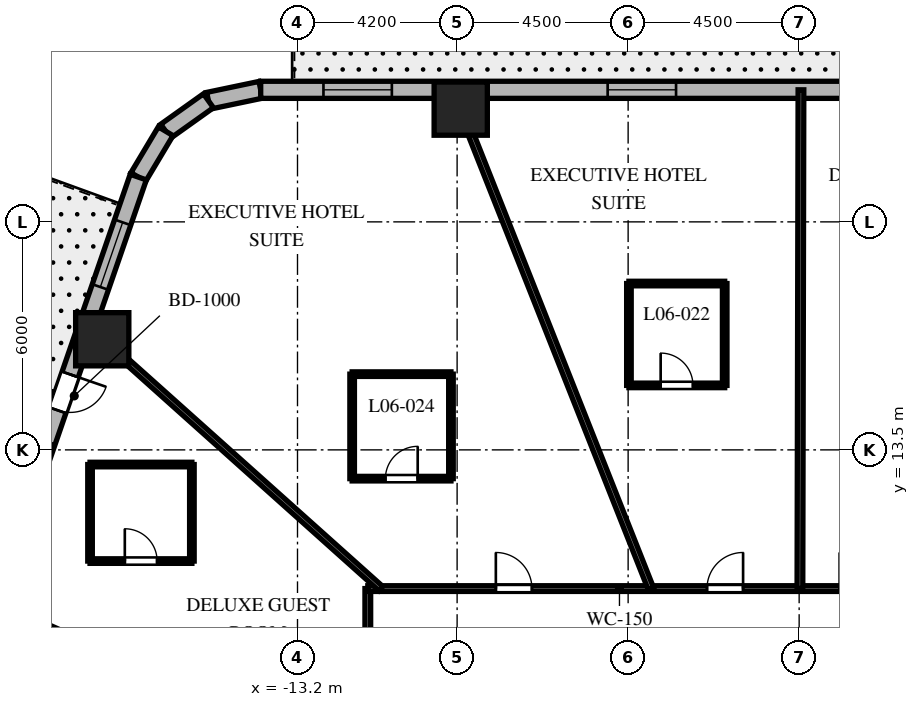
"""IFC4 building model, lengths in metres.
Left out: names, types, materials, properties, quantities, classifications, styles, units other than length and angle.
Written with IfcOpenShell. Run it as: python <this file> out.ifc"""

import sys

from ifc_helpers import new_model, si_unit, direction, frame, frame_2d, origin, origin_2d, place, context, subcontext, project, spatial, rectangle, extrude, element, fill, save


model = new_model("IFC4")
c1 = context("Model", 3, precision=1e-05, world=origin(), true_north=direction((0.0, 1.0)))
c2 = subcontext(c1, "Body", "Model", "MODEL_VIEW")
j1 = project(units=[si_unit("LENGTHUNIT", "METRE"), si_unit("PLANEANGLEUNIT", "RADIAN")], contexts=[c1])
p1 = place(None, origin())
s1 = spatial("IfcSite", under=j1, at=p1, CompositionType="ELEMENT")
p2 = place(p1, origin())
s2 = spatial("IfcBuilding", under=s1, at=p2, CompositionType="ELEMENT")
p3 = place(p2, frame((0.0, 0.0, 34.2)))
s3 = spatial("IfcBuildingStorey", under=s2, at=p3, CompositionType="ELEMENT", Elevation=34.2)
for number, where, z_axis, x_axis in (
    (1, (-8.905, 22.48, 0.0), (0.0, 0.0, 1.0), (1.0, 0.0, 0.0)),
    (2, (-18.338, 16.411, 0.0), (0.0, 0.0, 1.0), (1.0, 0.0, 0.0)),
):
    element("IfcColumn", number, at=place(p3, frame(where, z_axis=z_axis, x_axis=x_axis)), inside=s3, PredefinedType="COLUMN", context=c2, shape_type="SweptSolid", body=[
        extrude(rectangle(XDim=1.4, YDim=1.4, at=origin_2d()), origin(), (0.0, 0.0, 1.0), 3.7),
    ])
p4 = place(p3, frame((-14.168, 22.975, 0.0), z_axis=(0.0, 0.0, 1.0), x_axis=(-0.978770371074, -0.204959900243, 0.0)))
e3 = element("IfcWall", 3, at=p4, inside=s3, PredefinedType="SOLIDWALL", context=c2, shape_type="SweptSolid", body=[
    extrude(rectangle(XDim=1.406, YDim=0.45, at=frame_2d((0.703, 0.0))), origin(), (0.0, 0.0, 1.0), 3.4),
])
p5 = place(p3, frame((-15.544, 22.687, 0.0), z_axis=(0.0, 0.0, 1.0), x_axis=(-0.814210854316, -0.580569276412, 0.0)))
e4 = element("IfcWall", 4, at=p5, inside=s3, PredefinedType="SOLIDWALL", context=c2, shape_type="SweptSolid", body=[
    extrude(rectangle(XDim=1.381, YDim=0.45, at=frame_2d((0.691, 0.0))), origin(), (0.0, 0.0, 1.0), 3.4),
])
p6 = place(p3, frame((-16.669, 21.885, 0.0), z_axis=(0.0, 0.0, 1.0), x_axis=(-0.512936712947, -0.858426425799, 0.0)))
e5 = element("IfcWall", 5, at=p6, inside=s3, PredefinedType="SOLIDWALL", context=c2, shape_type="SweptSolid", body=[
    extrude(rectangle(XDim=1.406, YDim=0.45, at=frame_2d((0.703, 0.0))), origin(), (0.0, 0.0, 1.0), 3.4),
])
p7 = place(p3, frame((12.221, 22.975, 0.0), z_axis=(0.0, 0.0, 1.0), x_axis=(-1.0, 0.0, 0.0)))
e6 = element("IfcWall", 6, at=p7, inside=s3, PredefinedType="SOLIDWALL", context=c2, shape_type="SweptSolid", body=[
    extrude(rectangle(XDim=26.389, YDim=0.45, at=frame_2d((13.195, 0.0))), origin(), (0.0, 0.0, 1.0), 3.4),
])
p8 = place(p7, frame((2.799, 0.0, 0.0)))
e7 = element("IfcOpeningElement", 7, at=p8, cuts=e6, PredefinedType="OPENING", context=c2, shape_type="SweptSolid", body=[
    extrude(rectangle(XDim=0.95, YDim=2.15, at=frame_2d((0.475, 1.075))), frame((0.0, 0.235, 0.0), z_axis=(0.0, -1.0, 0.0), x_axis=(1.0, 0.0, 0.0)), (0.0, 0.0, 1.0), 0.47),
])
p9 = place(p7, frame((8.11, 0.0, 0.8)))
e8 = element("IfcOpeningElement", 8, at=p9, cuts=e6, PredefinedType="OPENING", context=c2, shape_type="SweptSolid", body=[
    extrude(rectangle(XDim=1.8, YDim=1.8, at=frame_2d((0.9, 0.9))), frame((0.0, 0.235, 0.0), z_axis=(0.0, -1.0, 0.0), x_axis=(1.0, 0.0, 0.0)), (0.0, 0.0, 1.0), 0.47),
])
p10 = place(p7, frame((15.46, 0.0, 0.8)))
e9 = element("IfcOpeningElement", 9, at=p10, cuts=e6, PredefinedType="OPENING", context=c2, shape_type="SweptSolid", body=[
    extrude(rectangle(XDim=1.8, YDim=1.8, at=frame_2d((0.9, 0.9))), frame((0.0, 0.235, 0.0), z_axis=(0.0, -1.0, 0.0), x_axis=(1.0, 0.0, 0.0)), (0.0, 0.0, 1.0), 0.47),
])
p11 = place(p7, frame((22.938, 0.0, 0.8)))
e10 = element("IfcOpeningElement", 10, at=p11, cuts=e6, PredefinedType="OPENING", context=c2, shape_type="SweptSolid", body=[
    extrude(rectangle(XDim=1.8, YDim=1.8, at=frame_2d((0.9, 0.9))), frame((0.0, 0.235, 0.0), z_axis=(0.0, -1.0, 0.0), x_axis=(1.0, 0.0, 0.0)), (0.0, 0.0, 1.0), 0.47),
])
p12 = place(p3, frame((-17.39, 20.678, 0.0), z_axis=(0.0, 0.0, 1.0), x_axis=(-0.326068018294, -0.945346310854, 0.0)))
e11 = element("IfcWall", 11, at=p12, inside=s3, PredefinedType="SOLIDWALL", context=c2, shape_type="SweptSolid", body=[
    extrude(rectangle(XDim=21.793, YDim=0.45, at=frame_2d((10.896, 0.0))), origin(), (0.0, 0.0, 1.0), 3.4),
])
p13 = place(p12, frame((5.493, 0.0, 0.0)))
e12 = element("IfcOpeningElement", 12, at=p13, cuts=e11, PredefinedType="OPENING", context=c2, shape_type="SweptSolid", body=[
    extrude(rectangle(XDim=1.0, YDim=2.15, at=frame_2d((0.5, 1.075))), frame((0.0, 0.235, 0.0), z_axis=(0.0, -1.0, 0.0), x_axis=(1.0, 0.0, 0.0)), (0.0, 0.0, 1.0), 0.47),
])
p14 = place(p12, frame((1.26, 0.0, 0.8)))
e13 = element("IfcOpeningElement", 13, at=p14, cuts=e11, PredefinedType="OPENING", context=c2, shape_type="SweptSolid", body=[
    extrude(rectangle(XDim=1.8, YDim=1.8, at=frame_2d((0.9, 0.9))), frame((0.0, 0.235, 0.0), z_axis=(0.0, -1.0, 0.0), x_axis=(1.0, 0.0, 0.0)), (0.0, 0.0, 1.0), 0.47),
])
p15 = place(p12, frame((7.363, 0.0, 0.8)))
e14 = element("IfcOpeningElement", 14, at=p15, cuts=e11, PredefinedType="OPENING", context=c2, shape_type="SweptSolid", body=[
    extrude(rectangle(XDim=1.8, YDim=1.8, at=frame_2d((0.9, 0.9))), frame((0.0, 0.235, 0.0), z_axis=(0.0, -1.0, 0.0), x_axis=(1.0, 0.0, 0.0)), (0.0, 0.0, 1.0), 0.47),
])
p16 = place(p12, frame((13.518, 0.0, 0.8)))
e15 = element("IfcOpeningElement", 15, at=p16, cuts=e11, PredefinedType="OPENING", context=c2, shape_type="SweptSolid", body=[
    extrude(rectangle(XDim=1.8, YDim=1.8, at=frame_2d((0.9, 0.9))), frame((0.0, 0.235, 0.0), z_axis=(0.0, -1.0, 0.0), x_axis=(1.0, 0.0, 0.0)), (0.0, 0.0, 1.0), 0.47),
])
p17 = place(p12, frame((18.68, 0.0, 0.8)))
e16 = element("IfcOpeningElement", 16, at=p17, cuts=e11, PredefinedType="OPENING", context=c2, shape_type="SweptSolid", body=[
    extrude(rectangle(XDim=1.8, YDim=1.8, at=frame_2d((0.9, 0.9))), frame((0.0, 0.235, 0.0), z_axis=(0.0, -1.0, 0.0), x_axis=(1.0, 0.0, 0.0)), (0.0, 0.0, 1.0), 0.47),
])
p18 = place(p3, frame((-11.35, -9.85, 0.0), z_axis=(0.0, 0.0, 1.0), x_axis=(0.0, 1.0, 0.0)))
e17 = element("IfcWall", 17, at=p18, inside=s3, PredefinedType="PARTITIONING", context=c2, shape_type="SweptSolid", body=[
    extrude(rectangle(XDim=19.7, YDim=0.15, at=frame_2d((9.85, 0.0))), origin(), (0.0, 0.0, 1.0), 2.84),
])
p19 = place(p18, frame((16.714, 0.0, 0.0)))
e18 = element("IfcOpeningElement", 18, at=p19, cuts=e17, PredefinedType="OPENING", context=c2, shape_type="SweptSolid", body=[
    extrude(rectangle(XDim=0.95, YDim=2.03, at=frame_2d((0.475, 1.015))), frame((0.0, 0.085, 0.0), z_axis=(0.0, -1.0, 0.0), x_axis=(1.0, 0.0, 0.0)), (0.0, 0.0, 1.0), 0.17),
])
p20 = place(p18, frame((12.932, 0.0, 0.0)))
e19 = element("IfcOpeningElement", 19, at=p20, cuts=e17, PredefinedType="OPENING", context=c2, shape_type="SweptSolid", body=[
    extrude(rectangle(XDim=0.95, YDim=2.03, at=frame_2d((0.475, 1.015))), frame((0.0, 0.085, 0.0), z_axis=(0.0, -1.0, 0.0), x_axis=(1.0, 0.0, 0.0)), (0.0, 0.0, 1.0), 0.17),
])
p21 = place(p18, frame((8.838, 0.0, 0.0)))
e20 = element("IfcOpeningElement", 20, at=p21, cuts=e17, PredefinedType="OPENING", context=c2, shape_type="SweptSolid", body=[
    extrude(rectangle(XDim=0.95, YDim=2.03, at=frame_2d((0.475, 1.015))), frame((0.0, 0.085, 0.0), z_axis=(0.0, -1.0, 0.0), x_axis=(1.0, 0.0, 0.0)), (0.0, 0.0, 1.0), 0.17),
])
p22 = place(p18, frame((4.461, 0.0, 0.0)))
e21 = element("IfcOpeningElement", 21, at=p22, cuts=e17, PredefinedType="OPENING", context=c2, shape_type="SweptSolid", body=[
    extrude(rectangle(XDim=0.95, YDim=2.03, at=frame_2d((0.475, 1.015))), frame((0.0, 0.085, 0.0), z_axis=(0.0, -1.0, 0.0), x_axis=(1.0, 0.0, 0.0)), (0.0, 0.0, 1.0), 0.17),
])
p23 = place(p18, frame((1.221, 0.0, 0.0)))
e22 = element("IfcOpeningElement", 22, at=p23, cuts=e17, PredefinedType="OPENING", context=c2, shape_type="SweptSolid", body=[
    extrude(rectangle(XDim=0.95, YDim=2.03, at=frame_2d((0.475, 1.015))), frame((0.0, 0.085, 0.0), z_axis=(0.0, -1.0, 0.0), x_axis=(1.0, 0.0, 0.0)), (0.0, 0.0, 1.0), 0.17),
])
p24 = place(p3, frame((-11.35, 9.85, 0.0), z_axis=(0.0, 0.0, 1.0), x_axis=(1.0, 0.0, 0.0)))
e23 = element("IfcWall", 23, at=p24, inside=s3, PredefinedType="PARTITIONING", context=c2, shape_type="SweptSolid", body=[
    extrude(rectangle(XDim=22.7, YDim=0.15, at=frame_2d((11.35, 0.0))), origin(), (0.0, 0.0, 1.0), 2.84),
])
p25 = place(p24, frame((18.436, 0.0, 0.0)))
e24 = element("IfcOpeningElement", 24, at=p25, cuts=e23, PredefinedType="OPENING", context=c2, shape_type="SweptSolid", body=[
    extrude(rectangle(XDim=0.95, YDim=2.03, at=frame_2d((0.475, 1.015))), frame((0.0, 0.085, 0.0), z_axis=(0.0, -1.0, 0.0), x_axis=(1.0, 0.0, 0.0)), (0.0, 0.0, 1.0), 0.17),
])
p26 = place(p24, frame((15.176, 0.0, 0.0)))
e25 = element("IfcOpeningElement", 25, at=p26, cuts=e23, PredefinedType="OPENING", context=c2, shape_type="SweptSolid", body=[
    extrude(rectangle(XDim=0.9, YDim=2.03, at=frame_2d((0.45, 1.015))), frame((0.0, 0.085, 0.0), z_axis=(0.0, -1.0, 0.0), x_axis=(1.0, 0.0, 0.0)), (0.0, 0.0, 1.0), 0.17),
])
p27 = place(p24, frame((12.415, 0.0, 0.0)))
e26 = element("IfcOpeningElement", 26, at=p27, cuts=e23, PredefinedType="OPENING", context=c2, shape_type="SweptSolid", body=[
    extrude(rectangle(XDim=0.95, YDim=2.03, at=frame_2d((0.475, 1.015))), frame((0.0, 0.085, 0.0), z_axis=(0.0, -1.0, 0.0), x_axis=(1.0, 0.0, 0.0)), (0.0, 0.0, 1.0), 0.17),
])
p28 = place(p24, frame((8.925, 0.0, 0.0)))
e27 = element("IfcOpeningElement", 27, at=p28, cuts=e23, PredefinedType="OPENING", context=c2, shape_type="SweptSolid", body=[
    extrude(rectangle(XDim=0.95, YDim=2.03, at=frame_2d((0.475, 1.015))), frame((0.0, 0.085, 0.0), z_axis=(0.0, -1.0, 0.0), x_axis=(1.0, 0.0, 0.0)), (0.0, 0.0, 1.0), 0.17),
])
p29 = place(p24, frame((3.369, 0.0, 0.0)))
e28 = element("IfcOpeningElement", 28, at=p29, cuts=e23, PredefinedType="OPENING", context=c2, shape_type="SweptSolid", body=[
    extrude(rectangle(XDim=0.95, YDim=2.03, at=frame_2d((0.475, 1.015))), frame((0.0, 0.085, 0.0), z_axis=(0.0, -1.0, 0.0), x_axis=(1.0, 0.0, 0.0)), (0.0, 0.0, 1.0), 0.17),
])
p30 = place(p3, frame((0.021, 9.85, 0.0), z_axis=(0.0, 0.0, 1.0), x_axis=(0.002064727742, 0.999997868447, 0.0)))
e29 = element("IfcWall", 29, at=p30, inside=s3, PredefinedType="PARTITIONING", context=c2, shape_type="SweptSolid", body=[
    extrude(rectangle(XDim=13.125, YDim=0.15, at=frame_2d((6.562, 0.0))), origin(), (0.0, 0.0, 1.0), 2.54),
])
p31 = place(p3, frame((-3.902, 9.85, 0.0), z_axis=(0.0, 0.0, 1.0), x_axis=(-0.36828765711, 0.929711891728, 0.0)))
e30 = element("IfcWall", 30, at=p31, inside=s3, PredefinedType="PARTITIONING", context=c2, shape_type="SweptSolid", body=[
    extrude(rectangle(XDim=14.117, YDim=0.15, at=frame_2d((7.059, 0.0))), origin(), (0.0, 0.0, 1.0), 2.54),
])
p32 = place(p3, frame((-11.007, 9.85, 0.0), z_axis=(0.0, 0.0, 1.0), x_axis=(-0.745177305978, 0.666866390407, 0.0)))
e31 = element("IfcWall", 31, at=p32, inside=s3, PredefinedType="PARTITIONING", context=c2, shape_type="SweptSolid", body=[
    extrude(rectangle(XDim=10.375, YDim=0.15, at=frame_2d((5.188, 0.0))), origin(), (0.0, 0.0, 1.0), 2.54),
])
p33 = place(p3, frame((-11.35, 5.068, 0.0), z_axis=(0.0, 0.0, 1.0), x_axis=(-0.913107192911, 0.407719577963, 0.0)))
e32 = element("IfcWall", 32, at=p33, inside=s3, PredefinedType="PARTITIONING", context=c2, shape_type="SweptSolid", body=[
    extrude(rectangle(XDim=10.841, YDim=0.15, at=frame_2d((5.421, 0.0))), origin(), (0.0, 0.0, 1.0), 2.54),
])
p34 = place(p3, frame((-4.479, 15.197, 0.0), z_axis=(0.0, 0.0, 1.0), x_axis=(1.0, 0.0, 0.0)))
e33 = element("IfcWall", 33, at=p34, inside=s3, PredefinedType="PARTITIONING", context=c2, shape_type="SweptSolid", body=[
    extrude(rectangle(XDim=2.52, YDim=0.12, at=frame_2d((1.26, 0.0))), origin(), (0.0, 0.0, 1.0), 3.4),
])
p35 = place(p34, frame((0.835, 0.0, 0.0)))
e34 = element("IfcOpeningElement", 34, at=p35, cuts=e33, PredefinedType="OPENING", context=c2, shape_type="SweptSolid", body=[
    extrude(rectangle(XDim=0.85, YDim=2.03, at=frame_2d((0.425, 1.015))), frame((0.0, 0.07, 0.0), z_axis=(0.0, -1.0, 0.0), x_axis=(1.0, 0.0, 0.0)), (0.0, 0.0, 1.0), 0.14),
])
p36 = place(p3, frame((-1.959, 15.197, 0.0), z_axis=(0.0, 0.0, 1.0), x_axis=(0.0, 1.0, 0.0)))
e35 = element("IfcWall", 35, at=p36, inside=s3, PredefinedType="PARTITIONING", context=c2, shape_type="SweptSolid", body=[
    extrude(rectangle(XDim=2.68, YDim=0.12, at=frame_2d((1.34, 0.0))), origin(), (0.0, 0.0, 1.0), 2.841),
])
p37 = place(p3, frame((-1.959, 17.877, 0.0), z_axis=(0.0, 0.0, 1.0), x_axis=(-1.0, 0.0, 0.0)))
e36 = element("IfcWall", 36, at=p37, inside=s3, PredefinedType="PARTITIONING", context=c2, shape_type="SweptSolid", body=[
    extrude(rectangle(XDim=2.52, YDim=0.12, at=frame_2d((1.26, 0.0))), origin(), (0.0, 0.0, 1.0), 2.841),
])
p38 = place(p3, frame((-4.479, 17.877, 0.0), z_axis=(0.0, 0.0, 1.0), x_axis=(0.0, -1.0, 0.0)))
e37 = element("IfcWall", 37, at=p38, inside=s3, PredefinedType="PARTITIONING", context=c2, shape_type="SweptSolid", body=[
    extrude(rectangle(XDim=2.68, YDim=0.12, at=frame_2d((1.34, 0.0))), origin(), (0.0, 0.0, 1.0), 2.841),
])
p39 = place(p3, frame((-11.762, 12.743, 0.0), z_axis=(0.0, 0.0, 1.0), x_axis=(1.0, 0.0, 0.0)))
e38 = element("IfcWall", 38, at=p39, inside=s3, PredefinedType="PARTITIONING", context=c2, shape_type="SweptSolid", body=[
    extrude(rectangle(XDim=2.6, YDim=0.12, at=frame_2d((1.3, 0.0))), origin(), (0.0, 0.0, 1.0), 2.972),
])
p40 = place(p39, frame((0.875, 0.0, 0.0)))
e39 = element("IfcOpeningElement", 39, at=p40, cuts=e38, PredefinedType="OPENING", context=c2, shape_type="SweptSolid", body=[
    extrude(rectangle(XDim=0.85, YDim=2.03, at=frame_2d((0.425, 1.015))), frame((0.0, 0.07, 0.0), z_axis=(0.0, -1.0, 0.0), x_axis=(1.0, 0.0, 0.0)), (0.0, 0.0, 1.0), 0.14),
])
p41 = place(p3, frame((-9.162, 12.743, 0.0), z_axis=(0.0, 0.0, 1.0), x_axis=(0.0, 1.0, 0.0)))
e40 = element("IfcWall", 40, at=p41, inside=s3, PredefinedType="PARTITIONING", context=c2, shape_type="SweptSolid", body=[
    extrude(rectangle(XDim=2.75, YDim=0.12, at=frame_2d((1.375, 0.0))), origin(), (0.0, 0.0, 1.0), 2.84),
])
p42 = place(p3, frame((-9.162, 15.493, 0.0), z_axis=(0.0, 0.0, 1.0), x_axis=(-1.0, 0.0, 0.0)))
e41 = element("IfcWall", 41, at=p42, inside=s3, PredefinedType="PARTITIONING", context=c2, shape_type="SweptSolid", body=[
    extrude(rectangle(XDim=2.6, YDim=0.12, at=frame_2d((1.3, 0.0))), origin(), (0.0, 0.0, 1.0), 3.4),
])
p43 = place(p3, frame((-11.762, 15.493, 0.0), z_axis=(0.0, 0.0, 1.0), x_axis=(0.0, -1.0, 0.0)))
e42 = element("IfcWall", 42, at=p43, inside=s3, PredefinedType="PARTITIONING", context=c2, shape_type="SweptSolid", body=[
    extrude(rectangle(XDim=2.75, YDim=0.12, at=frame_2d((1.375, 0.0))), origin(), (0.0, 0.0, 1.0), 3.4),
])
p44 = place(p3, frame((-18.659, 10.574, 0.0), z_axis=(0.0, 0.0, 1.0), x_axis=(1.0, 0.0, 0.0)))
e43 = element("IfcWall", 43, at=p44, inside=s3, PredefinedType="PARTITIONING", context=c2, shape_type="SweptSolid", body=[
    extrude(rectangle(XDim=2.68, YDim=0.12, at=frame_2d((1.34, 0.0))), origin(), (0.0, 0.0, 1.0), 2.972),
])
p45 = place(p44, frame((0.915, 0.0, 0.0)))
e44 = element("IfcOpeningElement", 44, at=p45, cuts=e43, PredefinedType="OPENING", context=c2, shape_type="SweptSolid", body=[
    extrude(rectangle(XDim=0.85, YDim=2.03, at=frame_2d((0.425, 1.015))), frame((0.0, 0.07, 0.0), z_axis=(0.0, -1.0, 0.0), x_axis=(1.0, 0.0, 0.0)), (0.0, 0.0, 1.0), 0.14),
])
p46 = place(p3, frame((-15.979, 10.574, 0.0), z_axis=(0.0, 0.0, 1.0), x_axis=(0.0, 1.0, 0.0)))
e45 = element("IfcWall", 45, at=p46, inside=s3, PredefinedType="PARTITIONING", context=c2, shape_type="SweptSolid", body=[
    extrude(rectangle(XDim=2.54, YDim=0.12, at=frame_2d((1.27, 0.0))), origin(), (0.0, 0.0, 1.0), 2.972),
])
p47 = place(p3, frame((-15.979, 13.114, 0.0), z_axis=(0.0, 0.0, 1.0), x_axis=(-1.0, 0.0, 0.0)))
e46 = element("IfcWall", 46, at=p47, inside=s3, PredefinedType="PARTITIONING", context=c2, shape_type="SweptSolid", body=[
    extrude(rectangle(XDim=2.68, YDim=0.12, at=frame_2d((1.34, 0.0))), origin(), (0.0, 0.0, 1.0), 3.4),
])
p48 = place(p3, frame((-18.659, 13.114, 0.0), z_axis=(0.0, 0.0, 1.0), x_axis=(0.0, -1.0, 0.0)))
e47 = element("IfcWall", 47, at=p48, inside=s3, PredefinedType="PARTITIONING", context=c2, shape_type="SweptSolid", body=[
    extrude(rectangle(XDim=2.54, YDim=0.12, at=frame_2d((1.27, 0.0))), origin(), (0.0, 0.0, 1.0), 3.4),
])
p49 = place(p10, origin())
e48 = element("IfcWindow", 48, at=p49, inside=s3, PartitioningType="SINGLE_PANEL", PredefinedType="WINDOW", context=c2, shape_type="SweptSolid", body=[
    extrude(rectangle(XDim=1.8, YDim=1.8, at=frame_2d((0.9, 0.9))), frame((0.0, 0.03, 0.0), z_axis=(0.0, -1.0, 0.0), x_axis=(1.0, 0.0, 0.0)), (0.0, 0.0, 1.0), 0.06),
])
fill(e9, e48)
p50 = place(p11, origin())
e49 = element("IfcWindow", 49, at=p50, inside=s3, PartitioningType="SINGLE_PANEL", PredefinedType="WINDOW", context=c2, shape_type="SweptSolid", body=[
    extrude(rectangle(XDim=1.8, YDim=1.8, at=frame_2d((0.9, 0.9))), frame((0.0, 0.03, 0.0), z_axis=(0.0, -1.0, 0.0), x_axis=(1.0, 0.0, 0.0)), (0.0, 0.0, 1.0), 0.06),
])
fill(e10, e49)
p51 = place(p13, origin())
e50 = element("IfcDoor", 50, at=p51, inside=s3, OperationType="SINGLE_SWING_LEFT", PredefinedType="DOOR", context=c2, shape_type="SweptSolid", body=[
    extrude(rectangle(XDim=1.0, YDim=2.15, at=frame_2d((0.5, 1.075))), frame((0.0, 0.025, 0.0), z_axis=(0.0, -1.0, 0.0), x_axis=(1.0, 0.0, 0.0)), (0.0, 0.0, 1.0), 0.05),
])
fill(e12, e50)
p52 = place(p14, origin())
e51 = element("IfcWindow", 51, at=p52, inside=s3, PartitioningType="SINGLE_PANEL", PredefinedType="WINDOW", context=c2, shape_type="SweptSolid", body=[
    extrude(rectangle(XDim=1.8, YDim=1.8, at=frame_2d((0.9, 0.9))), frame((0.0, 0.03, 0.0), z_axis=(0.0, -1.0, 0.0), x_axis=(1.0, 0.0, 0.0)), (0.0, 0.0, 1.0), 0.06),
])
fill(e13, e51)
p53 = place(p28, origin())
e52 = element("IfcDoor", 52, at=p53, inside=s3, OperationType="SINGLE_SWING_RIGHT", PredefinedType="DOOR", context=c2, shape_type="SweptSolid", body=[
    extrude(rectangle(XDim=0.95, YDim=2.03, at=frame_2d((0.475, 1.015))), frame((0.0, 0.025, 0.0), z_axis=(0.0, -1.0, 0.0), x_axis=(1.0, 0.0, 0.0)), (0.0, 0.0, 1.0), 0.05),
])
fill(e27, e52)
p54 = place(p35, origin())
e53 = element("IfcDoor", 53, at=p54, inside=s3, OperationType="SINGLE_SWING_LEFT", PredefinedType="DOOR", context=c2, shape_type="SweptSolid", body=[
    extrude(rectangle(XDim=0.85, YDim=2.03, at=frame_2d((0.425, 1.015))), frame((0.0, 0.025, 0.0), z_axis=(0.0, -1.0, 0.0), x_axis=(1.0, 0.0, 0.0)), (0.0, 0.0, 1.0), 0.05),
])
fill(e34, e53)
p55 = place(p29, origin())
e54 = element("IfcDoor", 54, at=p55, inside=s3, OperationType="SINGLE_SWING_LEFT", PredefinedType="DOOR", context=c2, shape_type="SweptSolid", body=[
    extrude(rectangle(XDim=0.95, YDim=2.03, at=frame_2d((0.475, 1.015))), frame((0.0, 0.025, 0.0), z_axis=(0.0, -1.0, 0.0), x_axis=(1.0, 0.0, 0.0)), (0.0, 0.0, 1.0), 0.05),
])
fill(e28, e54)
p56 = place(p40, origin())
e55 = element("IfcDoor", 55, at=p56, inside=s3, OperationType="SINGLE_SWING_RIGHT", PredefinedType="DOOR", context=c2, shape_type="SweptSolid", body=[
    extrude(rectangle(XDim=0.85, YDim=2.03, at=frame_2d((0.425, 1.015))), frame((0.0, 0.025, 0.0), z_axis=(0.0, -1.0, 0.0), x_axis=(1.0, 0.0, 0.0)), (0.0, 0.0, 1.0), 0.05),
])
fill(e39, e55)
p57 = place(p45, origin())
e56 = element("IfcDoor", 56, at=p57, inside=s3, OperationType="SINGLE_SWING_LEFT", PredefinedType="DOOR", context=c2, shape_type="SweptSolid", body=[
    extrude(rectangle(XDim=0.85, YDim=2.03, at=frame_2d((0.425, 1.015))), frame((0.0, 0.025, 0.0), z_axis=(0.0, -1.0, 0.0), x_axis=(1.0, 0.0, 0.0)), (0.0, 0.0, 1.0), 0.05),
])
fill(e44, e56)
save(model, sys.argv[1])
